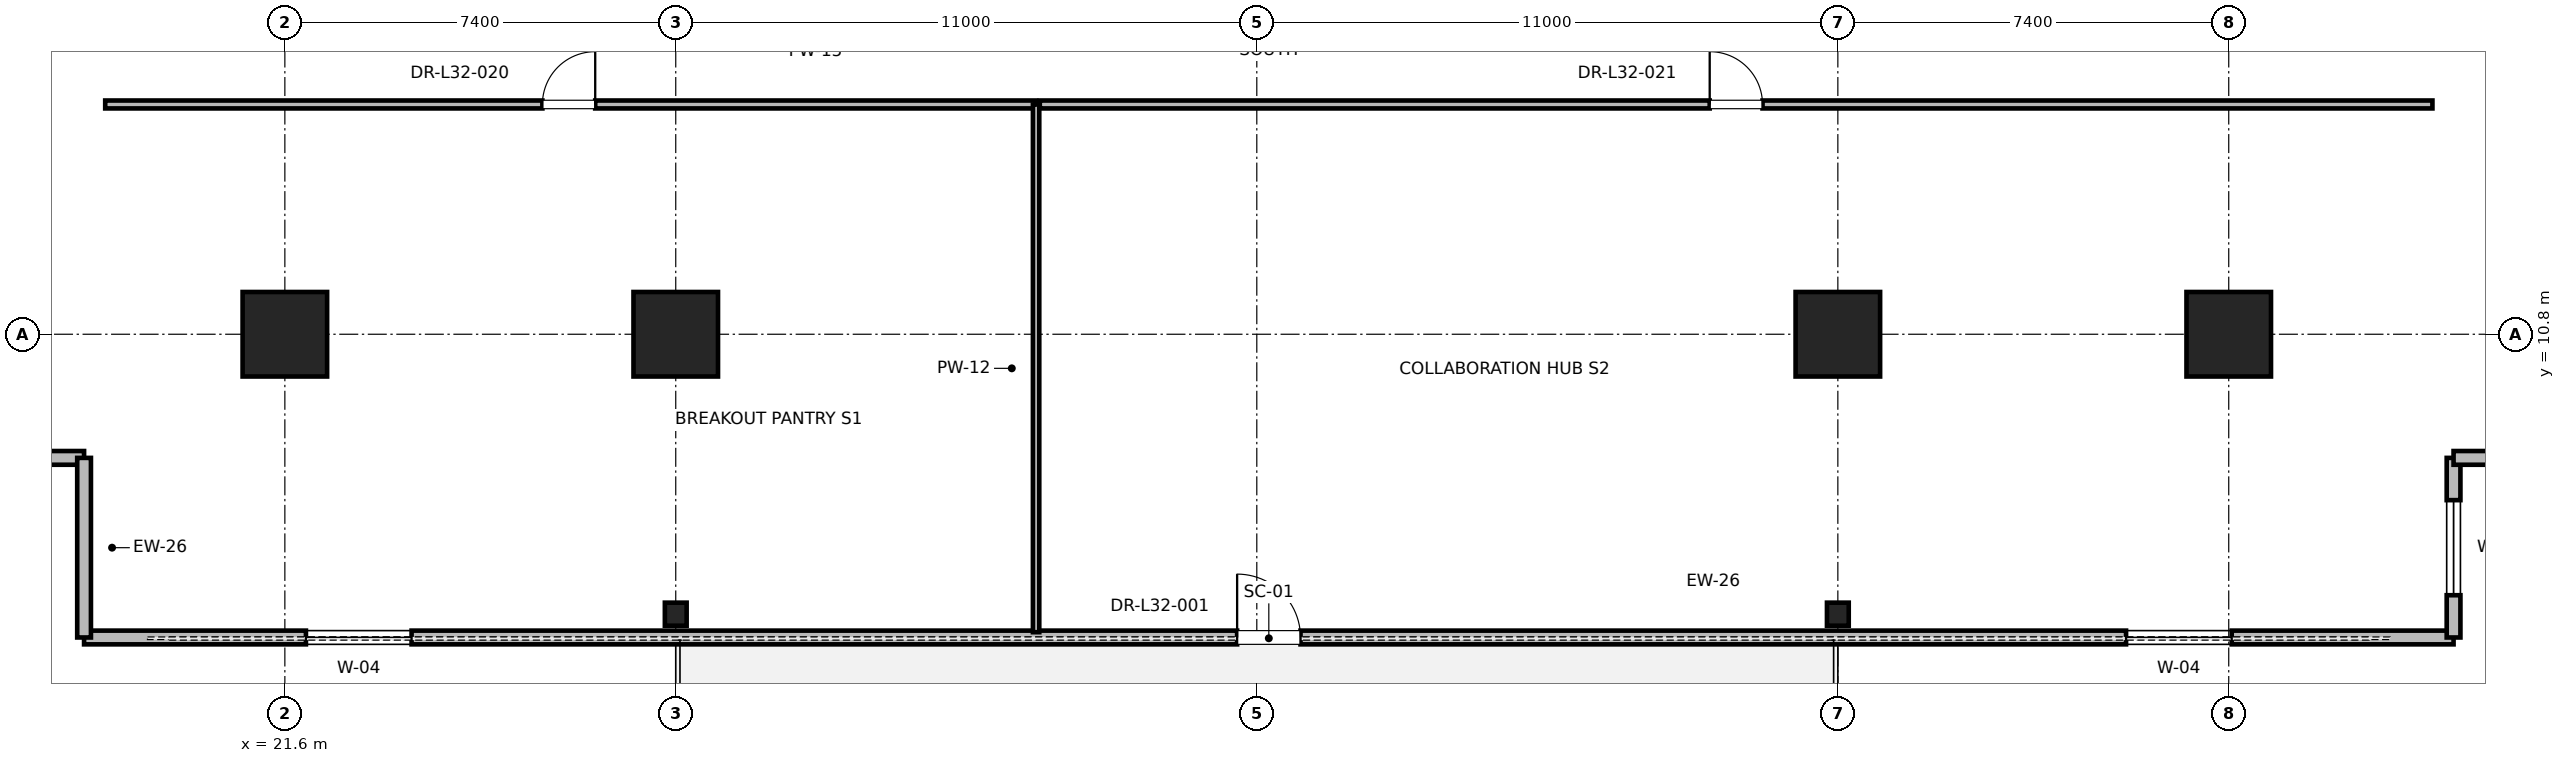
"""IFC4 building model, lengths in metres.
Left out: names, types, materials, properties, quantities, classifications, styles, units other than length and angle.
Written with IfcOpenShell. Run it as: python <this file> out.ifc"""

import sys

from ifc_helpers import new_model, si_unit, direction, frame, frame_2d, origin, origin_2d, place, context, subcontext, project, spatial, rectangle, i_section, extrude, element, fill, save


model = new_model("IFC4")
c1 = context("Model", 3, precision=1e-05, world=origin(), true_north=direction((0.0, 1.0)))
c2 = subcontext(c1, "Body", "Model", "MODEL_VIEW")
j1 = project(units=[si_unit("LENGTHUNIT", "METRE"), si_unit("PLANEANGLEUNIT", "RADIAN")], contexts=[c1])
p1 = place(None, origin())
s1 = spatial("IfcSite", under=j1, at=p1, CompositionType="ELEMENT")
p2 = place(p1, origin())
s2 = spatial("IfcBuilding", under=s1, at=p2, CompositionType="ELEMENT")
p3 = place(p2, frame((0.0, 0.0, 140.4)))
s3 = spatial("IfcBuildingStorey", under=s2, at=p3, CompositionType="ELEMENT", Elevation=140.4)
for number, where, z_axis, x_axis in (
    (1, (29.0, 10.8, 0.0), (0.0, 0.0, 1.0), (1.0, 0.0, 0.0)),
    (2, (51.0, 10.8, 0.0), (0.0, 0.0, 1.0), (1.0, 0.0, 0.0)),
    (3, (21.6, 10.8, 0.0), (0.0, 0.0, 1.0), (1.0, 0.0, 0.0)),
    (4, (58.4, 10.8, 0.0), (0.0, 0.0, 1.0), (1.0, 0.0, 0.0)),
):
    element("IfcColumn", number, at=place(p3, frame(where, z_axis=z_axis, x_axis=x_axis)), inside=s3, PredefinedType="COLUMN", context=c2, shape_type="SweptSolid", body=[
        extrude(rectangle(XDim=1.6, YDim=1.6, at=origin_2d()), origin(), (0.0, 0.0, 1.0), 4.0),
    ])
for number, where, z_axis, x_axis in (
    (5, (29.0, 5.5, 0.0), (0.0, 0.0, 1.0), (1.0, 0.0, 0.0)),
    (6, (51.0, 5.5, 0.0), (0.0, 0.0, 1.0), (1.0, 0.0, 0.0)),
):
    element("IfcColumn", number, at=place(p3, frame(where, z_axis=z_axis, x_axis=x_axis)), inside=s3, PredefinedType="COLUMN", context=c2, shape_type="SweptSolid", body=[
        extrude(i_section(OverallWidth=0.412, OverallDepth=0.437, WebThickness=0.036, FlangeThickness=0.058, FilletRadius=0.015, at=origin_2d()), origin(), (0.0, 0.0, 1.0), 4.0),
    ])
p4 = place(p3, frame((17.799, 5.059, 0.0), z_axis=(0.0, 0.0, 1.0), x_axis=(1.0, 0.0, 0.0)))
e7 = element("IfcWall", 7, at=p4, inside=s3, PredefinedType="PARAPET", context=c2, shape_type="SweptSolid", body=[
    extrude(rectangle(XDim=44.857, YDim=0.26, at=frame_2d((22.429, 0.0))), origin(), (0.0, 0.0, 1.0), 2.97),
])
p5 = place(p4, frame((4.2, 0.0, 0.85)))
e8 = element("IfcOpeningElement", 8, at=p5, cuts=e7, PredefinedType="OPENING", context=c2, shape_type="SweptSolid", body=[
    extrude(rectangle(XDim=2.0, YDim=2.3, at=frame_2d((1.0, 1.15))), frame((0.0, 0.13, 0.0), z_axis=(0.0, -1.0, 0.0), x_axis=(1.0, 0.0, 0.0)), (0.0, 0.0, 1.0), 0.26),
])
p6 = place(p4, frame((21.829, 0.0, 0.0)))
e9 = element("IfcOpeningElement", 9, at=p6, cuts=e7, PredefinedType="OPENING", context=c2, shape_type="SweptSolid", body=[
    extrude(rectangle(XDim=1.2, YDim=2.2, at=frame_2d((0.6, 1.1))), frame((0.0, 0.13, 0.0), z_axis=(0.0, -1.0, 0.0), x_axis=(1.0, 0.0, 0.0)), (0.0, 0.0, 1.0), 0.26),
])
p7 = place(p4, frame((38.657, 0.0, 0.85)))
e10 = element("IfcOpeningElement", 10, at=p7, cuts=e7, PredefinedType="OPENING", context=c2, shape_type="SweptSolid", body=[
    extrude(rectangle(XDim=2.0, YDim=2.3, at=frame_2d((1.0, 1.15))), frame((0.0, 0.13, 0.0), z_axis=(0.0, -1.0, 0.0), x_axis=(1.0, 0.0, 0.0)), (0.0, 0.0, 1.0), 0.26),
])
p8 = place(p3, frame((13.999, 8.459, 0.0), z_axis=(0.0, 0.0, 1.0), x_axis=(1.0, 0.0, 0.0)))
e11 = element("IfcWall", 11, at=p8, inside=s3, PredefinedType="PARAPET", context=c2, shape_type="SweptSolid", body=[
    extrude(rectangle(XDim=3.8, YDim=0.26, at=frame_2d((1.9, 0.0))), origin(), (0.0, 0.0, 1.0), 3.775),
])
p9 = place(p8, frame((1.0, 0.0, 0.85)))
e12 = element("IfcOpeningElement", 12, at=p9, cuts=e11, PredefinedType="OPENING", context=c2, shape_type="SweptSolid", body=[
    extrude(rectangle(XDim=1.8, YDim=2.2, at=frame_2d((0.9, 1.1))), frame((0.0, 0.13, 0.0), z_axis=(0.0, -1.0, 0.0), x_axis=(1.0, 0.0, 0.0)), (0.0, 0.0, 1.0), 0.26),
])
p10 = place(p3, frame((17.799, 8.459, 0.0), z_axis=(0.0, 0.0, 1.0), x_axis=(0.0, -1.0, 0.0)))
e13 = element("IfcWall", 13, at=p10, inside=s3, PredefinedType="PARAPET", context=c2, shape_type="SweptSolid", body=[
    extrude(rectangle(XDim=3.4, YDim=0.26, at=frame_2d((1.7, 0.0))), origin(), (0.0, 0.0, 1.0), 3.775),
])
p11 = place(p3, frame((62.656, 5.059, 0.0), z_axis=(0.0, 0.0, 1.0), x_axis=(0.0, 1.0, 0.0)))
e14 = element("IfcWall", 14, at=p11, inside=s3, PredefinedType="PARAPET", context=c2, shape_type="SweptSolid", body=[
    extrude(rectangle(XDim=3.4, YDim=0.26, at=frame_2d((1.7, 0.0))), origin(), (0.0, 0.0, 1.0), 3.775),
])
p12 = place(p11, frame((0.8, 0.0, 0.85)))
e15 = element("IfcOpeningElement", 15, at=p12, cuts=e14, PredefinedType="OPENING", context=c2, shape_type="SweptSolid", body=[
    extrude(rectangle(XDim=1.8, YDim=2.2, at=frame_2d((0.9, 1.1))), frame((0.0, 0.13, 0.0), z_axis=(0.0, -1.0, 0.0), x_axis=(1.0, 0.0, 0.0)), (0.0, 0.0, 1.0), 0.26),
])
p13 = place(p3, frame((62.656, 8.459, 0.0), z_axis=(0.0, 0.0, 1.0), x_axis=(1.0, 0.0, 0.0)))
e16 = element("IfcWall", 16, at=p13, inside=s3, PredefinedType="PARAPET", context=c2, shape_type="SweptSolid", body=[
    extrude(rectangle(XDim=3.8, YDim=0.26, at=frame_2d((1.9, 0.0))), origin(), (0.0, 0.0, 1.0), 3.775),
])
p14 = place(p3, frame((18.199, 15.15, 0.0), z_axis=(0.0, 0.0, 1.0), x_axis=(1.0, 0.0, 0.0)))
e17 = element("IfcWall", 17, at=p14, inside=s3, PredefinedType="PARTITIONING", context=c2, shape_type="SweptSolid", body=[
    extrude(rectangle(XDim=17.623, YDim=0.15, at=frame_2d((8.812, 0.0))), origin(), (0.0, 0.0, 1.0), 2.85),
])
p15 = place(p14, frame((8.277, 0.0, 0.0)))
e18 = element("IfcOpeningElement", 18, at=p15, cuts=e17, PredefinedType="OPENING", context=c2, shape_type="SweptSolid", body=[
    extrude(rectangle(XDim=1.0, YDim=2.15, at=frame_2d((0.5, 1.075))), frame((0.0, 0.075, 0.0), z_axis=(0.0, -1.0, 0.0), x_axis=(1.0, 0.0, 0.0)), (0.0, 0.0, 1.0), 0.15),
])
p16 = place(p3, frame((35.822, 5.159, 0.0), z_axis=(0.0, 0.0, 1.0), x_axis=(0.0, 1.0, 0.0)))
e19 = element("IfcWall", 19, at=p16, inside=s3, PredefinedType="PARTITIONING", context=c2, shape_type="SweptSolid", body=[
    extrude(rectangle(XDim=9.991, YDim=0.12, at=frame_2d((4.995, 0.0))), origin(), (0.0, 0.0, 1.0), 2.405),
])
p17 = place(p3, frame((35.892, 15.15, 0.0), z_axis=(0.0, 0.0, 1.0), x_axis=(1.0, 0.0, 0.0)))
e20 = element("IfcWall", 20, at=p17, inside=s3, PredefinedType="PARTITIONING", context=c2, shape_type="SweptSolid", body=[
    extrude(rectangle(XDim=26.364, YDim=0.15, at=frame_2d((13.182, 0.0))), origin(), (0.0, 0.0, 1.0), 2.85),
])
p18 = place(p17, frame((12.682, 0.0, 0.0)))
e21 = element("IfcOpeningElement", 21, at=p18, cuts=e20, PredefinedType="OPENING", context=c2, shape_type="SweptSolid", body=[
    extrude(rectangle(XDim=1.0, YDim=2.15, at=frame_2d((0.5, 1.075))), frame((0.0, 0.075, 0.0), z_axis=(0.0, -1.0, 0.0), x_axis=(1.0, 0.0, 0.0)), (0.0, 0.0, 1.0), 0.15),
])
p19 = place(p5, origin())
e22 = element("IfcWindow", 22, at=p19, inside=s3, PartitioningType="SINGLE_PANEL", PredefinedType="WINDOW", context=c2, shape_type="SweptSolid", body=[
    extrude(rectangle(XDim=2.0, YDim=2.3, at=frame_2d((1.0, 1.15))), frame((0.0, 0.03, 0.0), z_axis=(0.0, -1.0, 0.0), x_axis=(1.0, 0.0, 0.0)), (0.0, 0.0, 1.0), 0.06),
])
fill(e8, e22)
p20 = place(p6, origin())
e23 = element("IfcDoor", 23, at=p20, inside=s3, OperationType="SINGLE_SWING_LEFT", PredefinedType="DOOR", context=c2, shape_type="SweptSolid", body=[
    extrude(rectangle(XDim=1.2, YDim=2.2, at=frame_2d((0.6, 1.1))), frame((0.0, 0.025, 0.0), z_axis=(0.0, -1.0, 0.0), x_axis=(1.0, 0.0, 0.0)), (0.0, 0.0, 1.0), 0.05),
])
fill(e9, e23)
p21 = place(p7, origin())
e24 = element("IfcWindow", 24, at=p21, inside=s3, PartitioningType="SINGLE_PANEL", PredefinedType="WINDOW", context=c2, shape_type="SweptSolid", body=[
    extrude(rectangle(XDim=2.0, YDim=2.3, at=frame_2d((1.0, 1.15))), frame((0.0, 0.03, 0.0), z_axis=(0.0, -1.0, 0.0), x_axis=(1.0, 0.0, 0.0)), (0.0, 0.0, 1.0), 0.06),
])
fill(e10, e24)
p22 = place(p12, origin())
e25 = element("IfcWindow", 25, at=p22, inside=s3, PartitioningType="SINGLE_PANEL", PredefinedType="WINDOW", context=c2, shape_type="SweptSolid", body=[
    extrude(rectangle(XDim=1.8, YDim=2.2, at=frame_2d((0.9, 1.1))), frame((0.0, 0.03, 0.0), z_axis=(0.0, -1.0, 0.0), x_axis=(1.0, 0.0, 0.0)), (0.0, 0.0, 1.0), 0.06),
])
fill(e15, e25)
p23 = place(p15, origin())
e26 = element("IfcDoor", 26, at=p23, inside=s3, OperationType="SINGLE_SWING_RIGHT", PredefinedType="DOOR", context=c2, shape_type="SweptSolid", body=[
    extrude(rectangle(XDim=1.0, YDim=2.15, at=frame_2d((0.5, 1.075))), frame((0.0, 0.025, 0.0), z_axis=(0.0, -1.0, 0.0), x_axis=(1.0, 0.0, 0.0)), (0.0, 0.0, 1.0), 0.05),
])
fill(e18, e26)
p24 = place(p18, origin())
e27 = element("IfcDoor", 27, at=p24, inside=s3, OperationType="SINGLE_SWING_LEFT", PredefinedType="DOOR", context=c2, shape_type="SweptSolid", body=[
    extrude(rectangle(XDim=1.0, YDim=2.15, at=frame_2d((0.5, 1.075))), frame((0.0, 0.025, 0.0), z_axis=(0.0, -1.0, 0.0), x_axis=(1.0, 0.0, 0.0)), (0.0, 0.0, 1.0), 0.05),
])
fill(e21, e27)
save(model, sys.argv[1])
